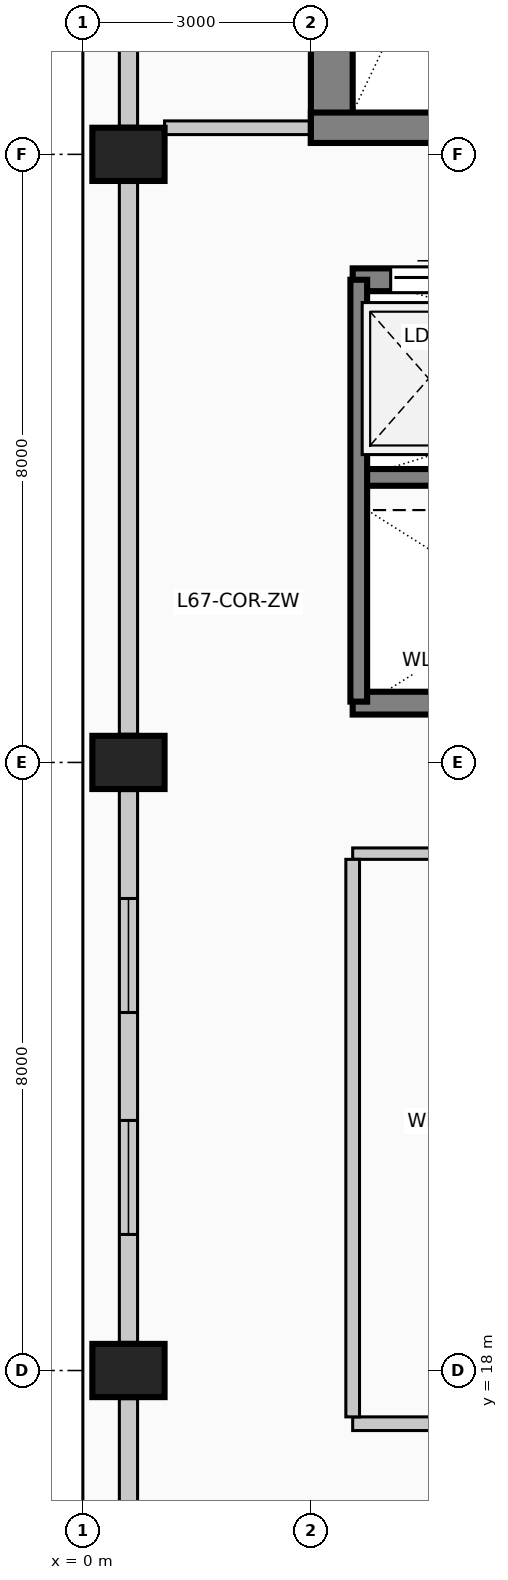
"""IFC4 building model, lengths in metres.
Left out: names, types, materials, properties, quantities, classifications, styles, units other than length and angle.
Written with IfcOpenShell. Run it as: python <this file> out.ifc"""

import sys

from ifc_helpers import new_model, si_unit, direction, frame, frame_2d, origin, origin_2d, place, context, subcontext, project, spatial, rectangle, extrude, element, fill, save


model = new_model("IFC4")
c1 = context("Model", 3, precision=1e-05, world=origin(), true_north=direction((0.0, 1.0)))
c2 = subcontext(c1, "Body", "Model", "MODEL_VIEW")
j1 = project(units=[si_unit("LENGTHUNIT", "METRE"), si_unit("PLANEANGLEUNIT", "RADIAN")], contexts=[c1])
p1 = place(None, origin())
s1 = spatial("IfcSite", under=j1, at=p1, CompositionType="ELEMENT")
p2 = place(p1, origin())
s2 = spatial("IfcBuilding", under=s1, at=p2, CompositionType="ELEMENT")
p3 = place(p2, frame((0.0, 0.0, 276.6)))
s3 = spatial("IfcBuildingStorey", under=s2, at=p3, CompositionType="ELEMENT", Elevation=276.6)
p4 = place(p3, frame((3.275, 34.15, 0.0), z_axis=(0.0, 0.0, 1.0), x_axis=(0.0, 1.0, 0.0)))
e1 = element("IfcWall", 1, at=p4, inside=s3, PredefinedType="SHEAR", context=c2, shape_type="SweptSolid", body=[
    extrude(rectangle(XDim=8.83, YDim=0.55, at=frame_2d((4.415, 0.0))), origin(), (0.0, 0.0, 1.0), 4.0),
])
p5 = place(p3, frame((3.0, 34.35, 0.0), z_axis=(0.0, 0.0, 1.0), x_axis=(1.0, 0.0, 0.0)))
e2 = element("IfcWall", 2, at=p5, inside=s3, PredefinedType="SHEAR", context=c2, shape_type="SweptSolid", body=[
    extrude(rectangle(XDim=4.71, YDim=0.4, at=frame_2d((2.355, 0.0))), origin(), (0.0, 0.0, 1.0), 4.0),
])
p6 = place(p5, frame((2.4, 0.0, 0.0)))
e3 = element("IfcOpeningElement", 3, at=p6, cuts=e2, PredefinedType="OPENING", context=c2, shape_type="SweptSolid", body=[
    extrude(rectangle(XDim=1.15, YDim=2.2, at=frame_2d((0.575, 1.1))), frame((0.0, 0.21, 0.0), z_axis=(0.0, -1.0, 0.0), x_axis=(1.0, 0.0, 0.0)), (0.0, 0.0, 1.0), 0.42),
])
for number, where, z_axis, x_axis in (
    (4, (0.6, 18.0, 0.0), (0.0, 0.0, 1.0), (0.0, 1.0, 0.0)),
    (5, (0.6, 26.0, 0.0), (0.0, 0.0, 1.0), (0.0, 1.0, 0.0)),
    (6, (0.6, 34.0, 0.0), (0.0, 0.0, 1.0), (0.0, 1.0, 0.0)),
):
    element("IfcColumn", number, at=place(p3, frame(where, z_axis=z_axis, x_axis=x_axis)), inside=s3, PredefinedType="COLUMN", context=c2, shape_type="SweptSolid", body=[
        extrude(rectangle(XDim=0.7, YDim=0.95, at=origin_2d()), origin(), (0.0, 0.0, 1.0), 4.0),
    ])
p7 = place(p3, frame((0.6, 10.37, 0.0), z_axis=(0.0, 0.0, 1.0), x_axis=(0.0, 1.0, 0.0)))
e7 = element("IfcWall", 7, at=p7, inside=s3, PredefinedType="SOLIDWALL", context=c2, shape_type="SweptSolid", body=[
    extrude(rectangle(XDim=7.26, YDim=0.24, at=frame_2d((3.63, 0.0))), origin(), (0.0, 0.0, 1.0), 2.91),
])
p8 = place(p7, frame((1.42, 0.0, 0.42)))
e8 = element("IfcOpeningElement", 8, at=p8, cuts=e7, PredefinedType="OPENING", context=c2, shape_type="SweptSolid", body=[
    extrude(rectangle(XDim=1.5, YDim=2.2, at=frame_2d((0.75, 1.1))), frame((0.0, 0.13, 0.0), z_axis=(0.0, -1.0, 0.0), x_axis=(1.0, 0.0, 0.0)), (0.0, 0.0, 1.0), 0.26),
])
p9 = place(p3, frame((0.6, 18.37, 0.0), z_axis=(0.0, 0.0, 1.0), x_axis=(0.0, 1.0, 0.0)))
e9 = element("IfcWall", 9, at=p9, inside=s3, PredefinedType="SOLIDWALL", context=c2, shape_type="SweptSolid", body=[
    extrude(rectangle(XDim=7.26, YDim=0.24, at=frame_2d((3.63, 0.0))), origin(), (0.0, 0.0, 1.0), 2.91),
])
p10 = place(p9, frame((1.42, 0.0, 0.42)))
e10 = element("IfcOpeningElement", 10, at=p10, cuts=e9, PredefinedType="OPENING", context=c2, shape_type="SweptSolid", body=[
    extrude(rectangle(XDim=1.5, YDim=2.2, at=frame_2d((0.75, 1.1))), frame((0.0, 0.13, 0.0), z_axis=(0.0, -1.0, 0.0), x_axis=(1.0, 0.0, 0.0)), (0.0, 0.0, 1.0), 0.26),
])
p11 = place(p9, frame((4.34, 0.0, 0.42)))
e11 = element("IfcOpeningElement", 11, at=p11, cuts=e9, PredefinedType="OPENING", context=c2, shape_type="SweptSolid", body=[
    extrude(rectangle(XDim=1.5, YDim=2.2, at=frame_2d((0.75, 1.1))), frame((0.0, 0.13, 0.0), z_axis=(0.0, -1.0, 0.0), x_axis=(1.0, 0.0, 0.0)), (0.0, 0.0, 1.0), 0.26),
])
p12 = place(p3, frame((0.6, 26.37, 0.0), z_axis=(0.0, 0.0, 1.0), x_axis=(0.0, 1.0, 0.0)))
e12 = element("IfcWall", 12, at=p12, inside=s3, PredefinedType="SOLIDWALL", context=c2, shape_type="SweptSolid", body=[
    extrude(rectangle(XDim=7.26, YDim=0.24, at=frame_2d((3.63, 0.0))), origin(), (0.0, 0.0, 1.0), 2.91),
])
p13 = place(p3, frame((0.6, 34.37, 0.0), z_axis=(0.0, 0.0, 1.0), x_axis=(0.0, 1.0, 0.0)))
e13 = element("IfcWall", 13, at=p13, inside=s3, PredefinedType="SOLIDWALL", context=c2, shape_type="SweptSolid", body=[
    extrude(rectangle(XDim=7.66, YDim=0.24, at=frame_2d((3.83, 0.0))), origin(), (0.0, 0.0, 1.0), 2.91),
])
p14 = place(p3, frame((3.55, 32.35, 0.0), z_axis=(0.0, 0.0, 1.0), x_axis=(1.0, 0.0, 0.0)))
e14 = element("IfcWall", 14, at=p14, inside=s3, PredefinedType="SOLIDWALL", context=c2, shape_type="SweptSolid", body=[
    extrude(rectangle(XDim=2.1, YDim=0.3, at=frame_2d((1.05, 0.0))), origin(), (0.0, 0.0, 1.0), 4.0),
])
p15 = place(p14, frame((0.5, 0.0, 0.0)))
e15 = element("IfcOpeningElement", 15, at=p15, cuts=e14, PredefinedType="OPENING", context=c2, shape_type="SweptSolid", body=[
    extrude(rectangle(XDim=1.1, YDim=2.2, at=frame_2d((0.55, 1.1))), frame((0.0, 0.16, 0.0), z_axis=(0.0, -1.0, 0.0), x_axis=(1.0, 0.0, 0.0)), (0.0, 0.0, 1.0), 0.32),
])
p16 = place(p3, frame((5.65, 26.78, 0.0), z_axis=(0.0, 0.0, 1.0), x_axis=(-1.0, 0.0, 0.0)))
e16 = element("IfcWall", 16, at=p16, inside=s3, PredefinedType="SOLIDWALL", context=c2, shape_type="SweptSolid", body=[
    extrude(rectangle(XDim=2.1, YDim=0.3, at=frame_2d((1.05, 0.0))), origin(), (0.0, 0.0, 1.0), 4.0),
])
p17 = place(p3, frame((3.55, 29.75, 0.0), z_axis=(0.0, 0.0, 1.0), x_axis=(1.0, 0.0, 0.0)))
e17 = element("IfcWall", 17, at=p17, inside=s3, PredefinedType="SOLIDWALL", context=c2, shape_type="SweptSolid", body=[
    extrude(rectangle(XDim=8.65, YDim=0.22, at=frame_2d((4.325, 0.0))), origin(), (0.0, 0.0, 1.0), 4.0),
])
p18 = place(p3, frame((3.63, 26.8, 0.0), z_axis=(0.0, 0.0, 1.0), x_axis=(0.0, 1.0, 0.0)))
e18 = element("IfcWall", 18, at=p18, inside=s3, PredefinedType="SOLIDWALL", context=c2, shape_type="SweptSolid", body=[
    extrude(rectangle(XDim=5.55, YDim=0.22, at=frame_2d((2.775, 0.0))), origin(), (0.0, 0.0, 1.0), 4.0),
])
p19 = place(p3, frame((3.55, 17.3, 0.0), z_axis=(0.0, 0.0, 1.0), x_axis=(1.0, 0.0, 0.0)))
e19 = element("IfcWall", 19, at=p19, inside=s3, PredefinedType="PARTITIONING", context=c2, shape_type="SweptSolid", body=[
    extrude(rectangle(XDim=6.25, YDim=0.18, at=frame_2d((3.125, 0.0))), origin(), (0.0, 0.0, 1.0), 3.66),
])
p20 = place(p19, frame((2.65, 0.0, 0.0)))
e20 = element("IfcOpeningElement", 20, at=p20, cuts=e19, PredefinedType="OPENING", context=c2, shape_type="SweptSolid", body=[
    extrude(rectangle(XDim=0.95, YDim=2.15, at=frame_2d((0.475, 1.075))), frame((0.0, 0.1, 0.0), z_axis=(0.0, -1.0, 0.0), x_axis=(1.0, 0.0, 0.0)), (0.0, 0.0, 1.0), 0.2),
])
p21 = place(p3, frame((3.55, 24.8, 0.0), z_axis=(0.0, 0.0, 1.0), x_axis=(1.0, 0.0, 0.0)))
e21 = element("IfcWall", 21, at=p21, inside=s3, PredefinedType="PARTITIONING", context=c2, shape_type="SweptSolid", body=[
    extrude(rectangle(XDim=6.25, YDim=0.15, at=frame_2d((3.125, 0.0))), origin(), (0.0, 0.0, 1.0), 3.66),
])
p22 = place(p3, frame((1.075, 34.35, 0.0), z_axis=(0.0, 0.0, 1.0), x_axis=(1.0, 0.0, 0.0)))
e22 = element("IfcWall", 22, at=p22, inside=s3, PredefinedType="PARTITIONING", context=c2, shape_type="SweptSolid", body=[
    extrude(rectangle(XDim=1.925, YDim=0.18, at=frame_2d((0.962, 0.0))), origin(), (0.0, 0.0, 1.0), 3.66),
])
p23 = place(p3, frame((3.55, 17.39, 0.0), z_axis=(0.0, 0.0, 1.0), x_axis=(0.0, 1.0, 0.0)))
e23 = element("IfcWall", 23, at=p23, inside=s3, PredefinedType="PARTITIONING", context=c2, shape_type="SweptSolid", body=[
    extrude(rectangle(XDim=7.335, YDim=0.18, at=frame_2d((3.667, 0.0))), origin(), (0.0, 0.0, 1.0), 3.66),
])
p24 = place(p10, origin())
e24 = element("IfcWindow", 24, at=p24, inside=s3, PartitioningType="SINGLE_PANEL", PredefinedType="WINDOW", context=c2, shape_type="SweptSolid", body=[
    extrude(rectangle(XDim=1.5, YDim=2.2, at=frame_2d((0.75, 1.1))), frame((0.0, 0.03, 0.0), z_axis=(0.0, -1.0, 0.0), x_axis=(1.0, 0.0, 0.0)), (0.0, 0.0, 1.0), 0.06),
])
fill(e10, e24)
p25 = place(p11, origin())
e25 = element("IfcWindow", 25, at=p25, inside=s3, PartitioningType="SINGLE_PANEL", PredefinedType="WINDOW", context=c2, shape_type="SweptSolid", body=[
    extrude(rectangle(XDim=1.5, YDim=2.2, at=frame_2d((0.75, 1.1))), frame((0.0, 0.03, 0.0), z_axis=(0.0, -1.0, 0.0), x_axis=(1.0, 0.0, 0.0)), (0.0, 0.0, 1.0), 0.06),
])
fill(e11, e25)
p26 = place(p15, origin())
e26 = element("IfcDoor", 26, at=p26, inside=s3, OperationType="SLIDING_TO_LEFT", PredefinedType="DOOR", context=c2, shape_type="SweptSolid", body=[
    extrude(rectangle(XDim=1.1, YDim=2.2, at=frame_2d((0.55, 1.1))), frame((0.0, 0.025, 0.0), z_axis=(0.0, -1.0, 0.0), x_axis=(1.0, 0.0, 0.0)), (0.0, 0.0, 1.0), 0.05),
])
fill(e15, e26)
save(model, sys.argv[1])
